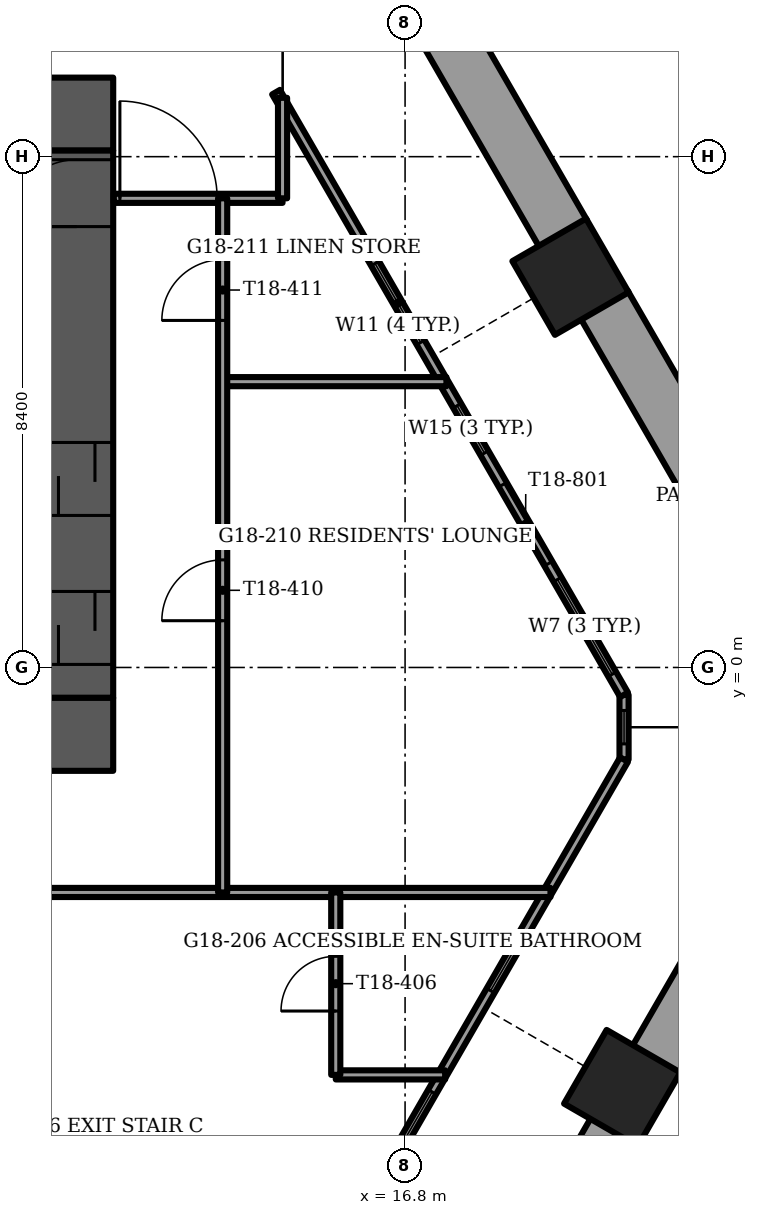
"""IFC4 building model, lengths in metres.
Left out: names, types, materials, properties, quantities, classifications, styles, units other than length and angle.
Written with IfcOpenShell. Run it as: python <this file> out.ifc"""

import sys

from ifc_helpers import new_model, si_unit, direction, frame, frame_2d, origin, origin_2d, place, context, subcontext, project, spatial, rectangle, extrude, element, fill, save


model = new_model("IFC4")
c1 = context("Model", 3, precision=1e-05, world=origin(), true_north=direction((0.0, 1.0)))
c2 = subcontext(c1, "Body", "Model", "MODEL_VIEW")
j1 = project(units=[si_unit("LENGTHUNIT", "METRE"), si_unit("PLANEANGLEUNIT", "RADIAN")], contexts=[c1])
p1 = place(None, origin())
s1 = spatial("IfcSite", under=j1, at=p1, CompositionType="ELEMENT")
p2 = place(p1, origin())
s2 = spatial("IfcBuilding", under=s1, at=p2, CompositionType="ELEMENT")
p3 = place(p2, frame((0.0, 0.0, 73.0)))
s3 = spatial("IfcBuildingStorey", under=s2, at=p3, CompositionType="ELEMENT", Elevation=73.0)
for number, where, z_axis, x_axis in (
    (1, (20.371, -6.917, -1.2), (0.0, 0.0, 1.0), (-0.5, -0.866, 0.0)),
    (2, (19.521, 6.426, -1.2), (0.0, 0.0, 1.0), (0.5, -0.866, 0.0)),
):
    element("IfcColumn", number, at=place(p3, frame(where, z_axis=z_axis, x_axis=x_axis)), inside=s3, PredefinedType="COLUMN", context=c2, shape_type="SweptSolid", body=[
        extrude(rectangle(XDim=1.4, YDim=1.4, at=origin_2d()), origin(), (0.0, 0.0, 1.0), 3.75),
    ])
p4 = place(p3, frame((-12.0, -1.1, -0.3), z_axis=(0.0, 0.0, 1.0), x_axis=(1.0, 0.0, 0.0)))
e3 = element("IfcWall", 3, at=p4, inside=s3, PredefinedType="SHEAR", context=c2, shape_type="SweptSolid", body=[
    extrude(rectangle(XDim=24.0, YDim=1.2, at=frame_2d((12.0, 0.0))), origin(), (0.0, 0.0, 1.0), 3.75),
])
p5 = place(p4, frame((11.2, 0.0, 0.0)))
e4 = element("IfcOpeningElement", 4, at=p5, cuts=e3, PredefinedType="OPENING", context=c2, shape_type="SweptSolid", body=[
    extrude(rectangle(XDim=1.6, YDim=2.1, at=frame_2d((0.8, 1.05))), frame((0.0, 0.6, 0.0), z_axis=(0.0, -1.0, 0.0), x_axis=(1.0, 0.0, 0.0)), (0.0, 0.0, 1.0), 1.2),
])
p6 = place(p3, frame((-12.0, 9.1, -0.3), z_axis=(0.0, 0.0, 1.0), x_axis=(1.0, 0.0, 0.0)))
e5 = element("IfcWall", 5, at=p6, inside=s3, PredefinedType="SHEAR", context=c2, shape_type="SweptSolid", body=[
    extrude(rectangle(XDim=24.0, YDim=1.2, at=frame_2d((12.0, 0.0))), origin(), (0.0, 0.0, 1.0), 3.75),
])
p7 = place(p6, frame((11.2, 0.0, 0.0)))
e6 = element("IfcOpeningElement", 6, at=p7, cuts=e5, PredefinedType="OPENING", context=c2, shape_type="SweptSolid", body=[
    extrude(rectangle(XDim=1.6, YDim=2.1, at=frame_2d((0.8, 1.05))), frame((0.0, 0.6, 0.0), z_axis=(0.0, -1.0, 0.0), x_axis=(1.0, 0.0, 0.0)), (0.0, 0.0, 1.0), 1.2),
])
p8 = place(p6, frame((5.25, 0.0, 0.0)))
e7 = element("IfcOpeningElement", 7, at=p8, cuts=e5, PredefinedType="OPENING", context=c2, shape_type="SweptSolid", body=[
    extrude(rectangle(XDim=1.1, YDim=2.1, at=frame_2d((0.55, 1.05))), frame((0.0, 0.6, 0.0), z_axis=(0.0, -1.0, 0.0), x_axis=(1.0, 0.0, 0.0)), (0.0, 0.0, 1.0), 1.2),
])
p9 = place(p6, frame((17.65, 0.0, 0.0)))
e8 = element("IfcOpeningElement", 8, at=p9, cuts=e5, PredefinedType="OPENING", context=c2, shape_type="SweptSolid", body=[
    extrude(rectangle(XDim=1.1, YDim=2.1, at=frame_2d((0.55, 1.05))), frame((0.0, 0.6, 0.0), z_axis=(0.0, -1.0, 0.0), x_axis=(1.0, 0.0, 0.0)), (0.0, 0.0, 1.0), 1.2),
])
p10 = place(p3, frame((11.4, -0.5, -0.3), z_axis=(0.0, 0.0, 1.0), x_axis=(0.0, 1.0, 0.0)))
e9 = element("IfcWall", 9, at=p10, inside=s3, PredefinedType="SHEAR", context=c2, shape_type="SweptSolid", body=[
    extrude(rectangle(XDim=9.0, YDim=1.2, at=frame_2d((4.5, 0.0))), origin(), (0.0, 0.0, 1.0), 3.75),
])
p11 = place(p10, frame((7.75, 0.0, 0.0)))
e10 = element("IfcOpeningElement", 10, at=p11, cuts=e9, PredefinedType="OPENING", context=c2, shape_type="SweptSolid", body=[
    extrude(rectangle(XDim=1.1, YDim=2.1, at=frame_2d((0.55, 1.05))), frame((0.0, 0.6, 0.0), z_axis=(0.0, -1.0, 0.0), x_axis=(1.0, 0.0, 0.0)), (0.0, 0.0, 1.0), 1.2),
])
p12 = place(p10, frame((0.55, 0.0, 0.0)))
e11 = element("IfcOpeningElement", 11, at=p12, cuts=e9, PredefinedType="OPENING", context=c2, shape_type="SweptSolid", body=[
    extrude(rectangle(XDim=1.2, YDim=2.1, at=frame_2d((0.6, 1.05))), frame((0.0, 0.6, 0.0), z_axis=(0.0, -1.0, 0.0), x_axis=(1.0, 0.0, 0.0)), (0.0, 0.0, 1.0), 1.2),
])
p13 = place(p10, frame((3.0, 0.0, 0.0)))
e12 = element("IfcOpeningElement", 12, at=p13, cuts=e9, PredefinedType="OPENING", context=c2, shape_type="SweptSolid", body=[
    extrude(rectangle(XDim=1.2, YDim=2.1, at=frame_2d((0.6, 1.05))), frame((0.0, 0.6, 0.0), z_axis=(0.0, -1.0, 0.0), x_axis=(1.0, 0.0, 0.0)), (0.0, 0.0, 1.0), 1.2),
])
p14 = place(p3, frame((16.727, -13.728, 0.0), z_axis=(0.0, 0.0, 1.0), x_axis=(0.499997206141, 0.866027016814, 0.0)))
e13 = element("IfcWall", 13, at=p14, inside=s3, PredefinedType="PARAPET", context=c2, shape_type="SweptSolid", body=[
    extrude(rectangle(XDim=7.051, YDim=0.9, at=frame_2d((3.525, 0.0))), origin(), (0.0, 0.0, 1.0), 1.1),
])
p15 = place(p3, frame((20.922, -6.461, 0.0), z_axis=(0.0, 0.0, 1.0), x_axis=(0.500009557824, 0.866019885502, 0.0)))
e14 = element("IfcWall", 14, at=p15, inside=s3, PredefinedType="PARAPET", context=c2, shape_type="SweptSolid", body=[
    extrude(rectangle(XDim=5.57, YDim=0.9, at=frame_2d((2.785, 0.0))), origin(), (0.0, 0.0, 1.0), 1.1),
])
p16 = place(p3, frame((23.707, -0.326, 0.0), z_axis=(0.0, 0.0, 1.0), x_axis=(-0.50000343918, 0.866023418164, 0.0)))
e15 = element("IfcWall", 15, at=p16, inside=s3, PredefinedType="PARAPET", context=c2, shape_type="SweptSolid", body=[
    extrude(rectangle(XDim=7.271, YDim=0.9, at=frame_2d((3.635, 0.0))), origin(), (0.0, 0.0, 1.0), 1.1),
])
p17 = place(p3, frame((19.402, 7.131, 0.0), z_axis=(0.0, 0.0, 1.0), x_axis=(-0.500012199891, 0.86601836006, 0.0)))
e16 = element("IfcWall", 16, at=p17, inside=s3, PredefinedType="PARAPET", context=c2, shape_type="SweptSolid", body=[
    extrude(rectangle(XDim=7.051, YDim=0.9, at=frame_2d((3.525, 0.0))), origin(), (0.0, 0.0, 1.0), 1.1),
])
p18 = place(p3, frame((14.679, -11.425, 0.0), z_axis=(0.0, 0.0, 1.0), x_axis=(0.499991453095, 0.866030338286, 0.0)))
e17 = element("IfcWall", 17, at=p18, inside=s3, PredefinedType="SOLIDWALL", context=c2, shape_type="SweptSolid", body=[
    extrude(rectangle(XDim=11.444, YDim=0.15, at=frame_2d((5.722, 0.0))), origin(), (0.0, 0.0, 1.0), 3.45),
])
p19 = place(p18, frame((3.632, 0.0, 0.15)))
e18 = element("IfcOpeningElement", 18, at=p19, cuts=e17, PredefinedType="OPENING", context=c2, shape_type="SweptSolid", body=[
    extrude(rectangle(XDim=1.5, YDim=2.2, at=frame_2d((0.75, 1.1))), frame((0.0, 0.075, 0.0), z_axis=(0.0, -1.0, 0.0), x_axis=(1.0, 0.0, 0.0)), (0.0, 0.0, 1.0), 0.15),
])
p20 = place(p18, frame((7.055, 0.0, 0.15)))
e19 = element("IfcOpeningElement", 19, at=p20, cuts=e17, PredefinedType="OPENING", context=c2, shape_type="SweptSolid", body=[
    extrude(rectangle(XDim=0.9, YDim=2.2, at=frame_2d((0.45, 1.1))), frame((0.0, 0.075, 0.0), z_axis=(0.0, -1.0, 0.0), x_axis=(1.0, 0.0, 0.0)), (0.0, 0.0, 1.0), 0.15),
])
p21 = place(p3, frame((20.401, -0.449, 0.0), z_axis=(0.0, 0.0, 1.0), x_axis=(-0.499991453095, 0.866030338286, 0.0)))
e20 = element("IfcWall", 20, at=p21, inside=s3, PredefinedType="SOLIDWALL", context=c2, shape_type="SweptSolid", body=[
    extrude(rectangle(XDim=11.444, YDim=0.15, at=frame_2d((5.722, 0.0))), origin(), (0.0, 0.0, 1.0), 3.45),
])
p22 = place(p21, frame((0.39, 0.0, 0.15)))
e21 = element("IfcOpeningElement", 21, at=p22, cuts=e20, PredefinedType="OPENING", context=c2, shape_type="SweptSolid", body=[
    extrude(rectangle(XDim=1.8, YDim=2.2, at=frame_2d((0.9, 1.1))), frame((0.0, 0.075, 0.0), z_axis=(0.0, -1.0, 0.0), x_axis=(1.0, 0.0, 0.0)), (0.0, 0.0, 1.0), 0.15),
])
p23 = place(p21, frame((2.49, 0.0, 0.0)))
e22 = element("IfcOpeningElement", 22, at=p23, cuts=e20, PredefinedType="OPENING", context=c2, shape_type="SweptSolid", body=[
    extrude(rectangle(XDim=1.5, YDim=2.4, at=frame_2d((0.75, 1.2))), frame((0.0, 0.075, 0.0), z_axis=(0.0, -1.0, 0.0), x_axis=(1.0, 0.0, 0.0)), (0.0, 0.0, 1.0), 0.15),
])
p24 = place(p21, frame((4.59, 0.0, 0.15)))
e23 = element("IfcOpeningElement", 23, at=p24, cuts=e20, PredefinedType="OPENING", context=c2, shape_type="SweptSolid", body=[
    extrude(rectangle(XDim=0.9, YDim=2.2, at=frame_2d((0.45, 1.1))), frame((0.0, 0.075, 0.0), z_axis=(0.0, -1.0, 0.0), x_axis=(1.0, 0.0, 0.0)), (0.0, 0.0, 1.0), 0.15),
])
p25 = place(p21, frame((6.69, 0.0, 0.15)))
e24 = element("IfcOpeningElement", 24, at=p25, cuts=e20, PredefinedType="OPENING", context=c2, shape_type="SweptSolid", body=[
    extrude(rectangle(XDim=1.5, YDim=2.2, at=frame_2d((0.75, 1.1))), frame((0.0, 0.075, 0.0), z_axis=(0.0, -1.0, 0.0), x_axis=(1.0, 0.0, 0.0)), (0.0, 0.0, 1.0), 0.15),
])
p26 = place(p3, frame((20.401, -1.514, 0.0), z_axis=(0.0, 0.0, 1.0), x_axis=(0.0, 1.0, 0.0)))
e25 = element("IfcWall", 25, at=p26, inside=s3, PredefinedType="SOLIDWALL", context=c2, shape_type="SweptSolid", body=[
    extrude(rectangle(XDim=1.065, YDim=0.15, at=frame_2d((0.532, 0.0))), origin(), (0.0, 0.0, 1.0), 3.45),
])
p27 = place(p26, frame((0.258, 0.0, 0.15)))
e26 = element("IfcOpeningElement", 26, at=p27, cuts=e25, PredefinedType="OPENING", context=c2, shape_type="SweptSolid", body=[
    extrude(rectangle(XDim=0.55, YDim=2.2, at=frame_2d((0.275, 1.1))), frame((0.0, 0.075, 0.0), z_axis=(0.0, -1.0, 0.0), x_axis=(1.0, 0.0, 0.0)), (0.0, 0.0, 1.0), 0.15),
])
p28 = place(p3, frame((15.66, -6.7, 0.0), z_axis=(0.0, 0.0, 1.0), x_axis=(1.0, 0.0, 0.0)))
e27 = element("IfcWall", 27, at=p28, inside=s3, PredefinedType="PARTITIONING", context=c2, shape_type="SweptSolid", body=[
    extrude(rectangle(XDim=1.799, YDim=0.15, at=frame_2d((0.899, 0.0))), origin(), (0.0, 0.0, 1.0), 3.45),
])
p29 = place(p3, frame((9.16, -3.7, 0.0), z_axis=(0.0, 0.0, 1.0), x_axis=(1.0, 0.0, 0.0)))
e28 = element("IfcWall", 28, at=p29, inside=s3, PredefinedType="PARTITIONING", context=c2, shape_type="SweptSolid", body=[
    extrude(rectangle(XDim=10.031, YDim=0.15, at=frame_2d((5.016, 0.0))), origin(), (0.0, 0.0, 1.0), 3.45),
])
p30 = place(p29, frame((0.24, 0.0, 0.0)))
e29 = element("IfcOpeningElement", 29, at=p30, cuts=e28, PredefinedType="OPENING", context=c2, shape_type="SweptSolid", body=[
    extrude(rectangle(XDim=1.0, YDim=2.1, at=frame_2d((0.5, 1.05))), frame((0.0, 0.075, 0.0), z_axis=(0.0, -1.0, 0.0), x_axis=(1.0, 0.0, 0.0)), (0.0, 0.0, 1.0), 0.15),
])
p31 = place(p3, frame((13.8, 4.7, 0.0), z_axis=(0.0, 0.0, 1.0), x_axis=(1.0, 0.0, 0.0)))
e30 = element("IfcWall", 30, at=p31, inside=s3, PredefinedType="PARTITIONING", context=c2, shape_type="SweptSolid", body=[
    extrude(rectangle(XDim=3.68, YDim=0.15, at=frame_2d((1.84, 0.0))), origin(), (0.0, 0.0, 1.0), 3.45),
])
p32 = place(p3, frame((12.01, 7.715, 0.0), z_axis=(0.0, 0.0, 1.0), x_axis=(1.0, 0.0, 0.0)))
e31 = element("IfcWall", 31, at=p32, inside=s3, PredefinedType="PARTITIONING", context=c2, shape_type="SweptSolid", body=[
    extrude(rectangle(XDim=2.775, YDim=0.15, at=frame_2d((1.387, 0.0))), origin(), (0.0, 0.0, 1.0), 3.45),
])
p33 = place(p32, frame((0.1, 0.0, 0.0)))
e32 = element("IfcOpeningElement", 32, at=p33, cuts=e31, PredefinedType="OPENING", context=c2, shape_type="SweptSolid", body=[
    extrude(rectangle(XDim=1.6, YDim=2.1, at=frame_2d((0.8, 1.05))), frame((0.0, 0.075, 0.0), z_axis=(0.0, -1.0, 0.0), x_axis=(1.0, 0.0, 0.0)), (0.0, 0.0, 1.0), 0.15),
])
p34 = place(p3, frame((15.66, -6.7, 0.0), z_axis=(0.0, 0.0, 1.0), x_axis=(0.0, 1.0, 0.0)))
e33 = element("IfcWall", 33, at=p34, inside=s3, PredefinedType="PARTITIONING", context=c2, shape_type="SweptSolid", body=[
    extrude(rectangle(XDim=3.0, YDim=0.15, at=frame_2d((1.5, 0.0))), origin(), (0.0, 0.0, 1.0), 3.45),
])
p35 = place(p34, frame((1.05, 0.0, 0.0)))
e34 = element("IfcOpeningElement", 34, at=p35, cuts=e33, PredefinedType="OPENING", context=c2, shape_type="SweptSolid", body=[
    extrude(rectangle(XDim=0.9, YDim=2.1, at=frame_2d((0.45, 1.05))), frame((0.0, 0.075, 0.0), z_axis=(0.0, -1.0, 0.0), x_axis=(1.0, 0.0, 0.0)), (0.0, 0.0, 1.0), 0.15),
])
p36 = place(p3, frame((14.785, 7.715, 0.0), z_axis=(0.0, 0.0, 1.0), x_axis=(0.0, 1.0, 0.0)))
e35 = element("IfcWall", 35, at=p36, inside=s3, PredefinedType="PARTITIONING", context=c2, shape_type="SweptSolid", body=[
    extrude(rectangle(XDim=1.653, YDim=0.15, at=frame_2d((0.826, 0.0))), origin(), (0.0, 0.0, 1.0), 3.45),
])
p37 = place(p3, frame((13.8, -3.7, 0.0), z_axis=(0.0, 0.0, 1.0), x_axis=(0.0, 1.0, 0.0)))
e36 = element("IfcWall", 36, at=p37, inside=s3, PredefinedType="PARTITIONING", context=c2, shape_type="SweptSolid", body=[
    extrude(rectangle(XDim=11.415, YDim=0.15, at=frame_2d((5.708, 0.0))), origin(), (0.0, 0.0, 1.0), 3.45),
])
p38 = place(p37, frame((4.469, 0.0, 0.0)))
e37 = element("IfcOpeningElement", 37, at=p38, cuts=e36, PredefinedType="OPENING", context=c2, shape_type="SweptSolid", body=[
    extrude(rectangle(XDim=1.0, YDim=2.1, at=frame_2d((0.5, 1.05))), frame((0.0, 0.075, 0.0), z_axis=(0.0, -1.0, 0.0), x_axis=(1.0, 0.0, 0.0)), (0.0, 0.0, 1.0), 0.15),
])
p39 = place(p37, frame((9.407, 0.0, 0.0)))
e38 = element("IfcOpeningElement", 38, at=p39, cuts=e36, PredefinedType="OPENING", context=c2, shape_type="SweptSolid", body=[
    extrude(rectangle(XDim=1.0, YDim=2.1, at=frame_2d((0.5, 1.05))), frame((0.0, 0.075, 0.0), z_axis=(0.0, -1.0, 0.0), x_axis=(1.0, 0.0, 0.0)), (0.0, 0.0, 1.0), 0.15),
])
p40 = place(p19, origin())
e39 = element("IfcWindow", 39, at=p40, inside=s3, PartitioningType="SINGLE_PANEL", PredefinedType="WINDOW", context=c2, shape_type="SweptSolid", body=[
    extrude(rectangle(XDim=1.5, YDim=2.2, at=frame_2d((0.75, 1.1))), frame((0.0, 0.03, 0.0), z_axis=(0.0, -1.0, 0.0), x_axis=(1.0, 0.0, 0.0)), (0.0, 0.0, 1.0), 0.06),
])
fill(e18, e39)
p41 = place(p20, origin())
e40 = element("IfcWindow", 40, at=p41, inside=s3, PartitioningType="SINGLE_PANEL", PredefinedType="WINDOW", context=c2, shape_type="SweptSolid", body=[
    extrude(rectangle(XDim=0.9, YDim=2.2, at=frame_2d((0.45, 1.1))), frame((0.0, 0.03, 0.0), z_axis=(0.0, -1.0, 0.0), x_axis=(1.0, 0.0, 0.0)), (0.0, 0.0, 1.0), 0.06),
])
fill(e19, e40)
p42 = place(p22, origin())
e41 = element("IfcWindow", 41, at=p42, inside=s3, PartitioningType="SINGLE_PANEL", PredefinedType="WINDOW", context=c2, shape_type="SweptSolid", body=[
    extrude(rectangle(XDim=1.8, YDim=2.2, at=frame_2d((0.9, 1.1))), frame((0.0, 0.03, 0.0), z_axis=(0.0, -1.0, 0.0), x_axis=(1.0, 0.0, 0.0)), (0.0, 0.0, 1.0), 0.06),
])
fill(e21, e41)
p43 = place(p23, origin())
e42 = element("IfcDoor", 42, at=p43, inside=s3, OperationType="SLIDING_TO_LEFT", PredefinedType="DOOR", context=c2, shape_type="SweptSolid", body=[
    extrude(rectangle(XDim=1.5, YDim=2.4, at=frame_2d((0.75, 1.2))), frame((0.0, 0.025, 0.0), z_axis=(0.0, -1.0, 0.0), x_axis=(1.0, 0.0, 0.0)), (0.0, 0.0, 1.0), 0.05),
])
fill(e22, e42)
p44 = place(p24, origin())
e43 = element("IfcWindow", 43, at=p44, inside=s3, PartitioningType="SINGLE_PANEL", PredefinedType="WINDOW", context=c2, shape_type="SweptSolid", body=[
    extrude(rectangle(XDim=0.9, YDim=2.2, at=frame_2d((0.45, 1.1))), frame((0.0, 0.03, 0.0), z_axis=(0.0, -1.0, 0.0), x_axis=(1.0, 0.0, 0.0)), (0.0, 0.0, 1.0), 0.06),
])
fill(e23, e43)
p45 = place(p25, origin())
e44 = element("IfcWindow", 44, at=p45, inside=s3, PartitioningType="SINGLE_PANEL", PredefinedType="WINDOW", context=c2, shape_type="SweptSolid", body=[
    extrude(rectangle(XDim=1.5, YDim=2.2, at=frame_2d((0.75, 1.1))), frame((0.0, 0.03, 0.0), z_axis=(0.0, -1.0, 0.0), x_axis=(1.0, 0.0, 0.0)), (0.0, 0.0, 1.0), 0.06),
])
fill(e24, e44)
p46 = place(p27, origin())
e45 = element("IfcWindow", 45, at=p46, inside=s3, PartitioningType="SINGLE_PANEL", PredefinedType="WINDOW", context=c2, shape_type="SweptSolid", body=[
    extrude(rectangle(XDim=0.55, YDim=2.2, at=frame_2d((0.275, 1.1))), frame((0.0, 0.03, 0.0), z_axis=(0.0, -1.0, 0.0), x_axis=(1.0, 0.0, 0.0)), (0.0, 0.0, 1.0), 0.06),
])
fill(e26, e45)
p47 = place(p11, origin())
e46 = element("IfcDoor", 46, at=p47, inside=s3, OperationType="SINGLE_SWING_RIGHT", PredefinedType="DOOR", context=c2, shape_type="SweptSolid", body=[
    extrude(rectangle(XDim=1.1, YDim=2.1, at=frame_2d((0.55, 1.05))), frame((0.0, 0.025, 0.0), z_axis=(0.0, -1.0, 0.0), x_axis=(1.0, 0.0, 0.0)), (0.0, 0.0, 1.0), 0.05),
])
fill(e10, e46)
p48 = place(p12, origin())
e47 = element("IfcDoor", 47, at=p48, inside=s3, OperationType="SLIDING_TO_LEFT", PredefinedType="DOOR", context=c2, shape_type="SweptSolid", body=[
    extrude(rectangle(XDim=1.2, YDim=2.1, at=frame_2d((0.6, 1.05))), frame((0.0, 0.025, 0.0), z_axis=(0.0, -1.0, 0.0), x_axis=(1.0, 0.0, 0.0)), (0.0, 0.0, 1.0), 0.05),
])
fill(e11, e47)
p49 = place(p13, origin())
e48 = element("IfcDoor", 48, at=p49, inside=s3, OperationType="SLIDING_TO_LEFT", PredefinedType="DOOR", context=c2, shape_type="SweptSolid", body=[
    extrude(rectangle(XDim=1.2, YDim=2.1, at=frame_2d((0.6, 1.05))), frame((0.0, 0.025, 0.0), z_axis=(0.0, -1.0, 0.0), x_axis=(1.0, 0.0, 0.0)), (0.0, 0.0, 1.0), 0.05),
])
fill(e12, e48)
p50 = place(p35, origin())
e49 = element("IfcDoor", 49, at=p50, inside=s3, OperationType="SINGLE_SWING_RIGHT", PredefinedType="DOOR", context=c2, shape_type="SweptSolid", body=[
    extrude(rectangle(XDim=0.9, YDim=2.1, at=frame_2d((0.45, 1.05))), frame((0.0, 0.025, 0.0), z_axis=(0.0, -1.0, 0.0), x_axis=(1.0, 0.0, 0.0)), (0.0, 0.0, 1.0), 0.05),
])
fill(e34, e49)
p51 = place(p38, origin())
e50 = element("IfcDoor", 50, at=p51, inside=s3, OperationType="SINGLE_SWING_RIGHT", PredefinedType="DOOR", context=c2, shape_type="SweptSolid", body=[
    extrude(rectangle(XDim=1.0, YDim=2.1, at=frame_2d((0.5, 1.05))), frame((0.0, 0.025, 0.0), z_axis=(0.0, -1.0, 0.0), x_axis=(1.0, 0.0, 0.0)), (0.0, 0.0, 1.0), 0.05),
])
fill(e37, e50)
p52 = place(p39, origin())
e51 = element("IfcDoor", 51, at=p52, inside=s3, OperationType="SINGLE_SWING_LEFT", PredefinedType="DOOR", context=c2, shape_type="SweptSolid", body=[
    extrude(rectangle(XDim=1.0, YDim=2.1, at=frame_2d((0.5, 1.05))), frame((0.0, 0.025, 0.0), z_axis=(0.0, -1.0, 0.0), x_axis=(1.0, 0.0, 0.0)), (0.0, 0.0, 1.0), 0.05),
])
fill(e38, e51)
p53 = place(p33, origin())
e52 = element("IfcDoor", 52, at=p53, inside=s3, OperationType="DOUBLE_DOOR_SINGLE_SWING", PredefinedType="DOOR", context=c2, shape_type="SweptSolid", body=[
    extrude(rectangle(XDim=1.6, YDim=2.1, at=frame_2d((0.8, 1.05))), frame((0.0, 0.025, 0.0), z_axis=(0.0, -1.0, 0.0), x_axis=(1.0, 0.0, 0.0)), (0.0, 0.0, 1.0), 0.05),
])
fill(e32, e52)
save(model, sys.argv[1])
